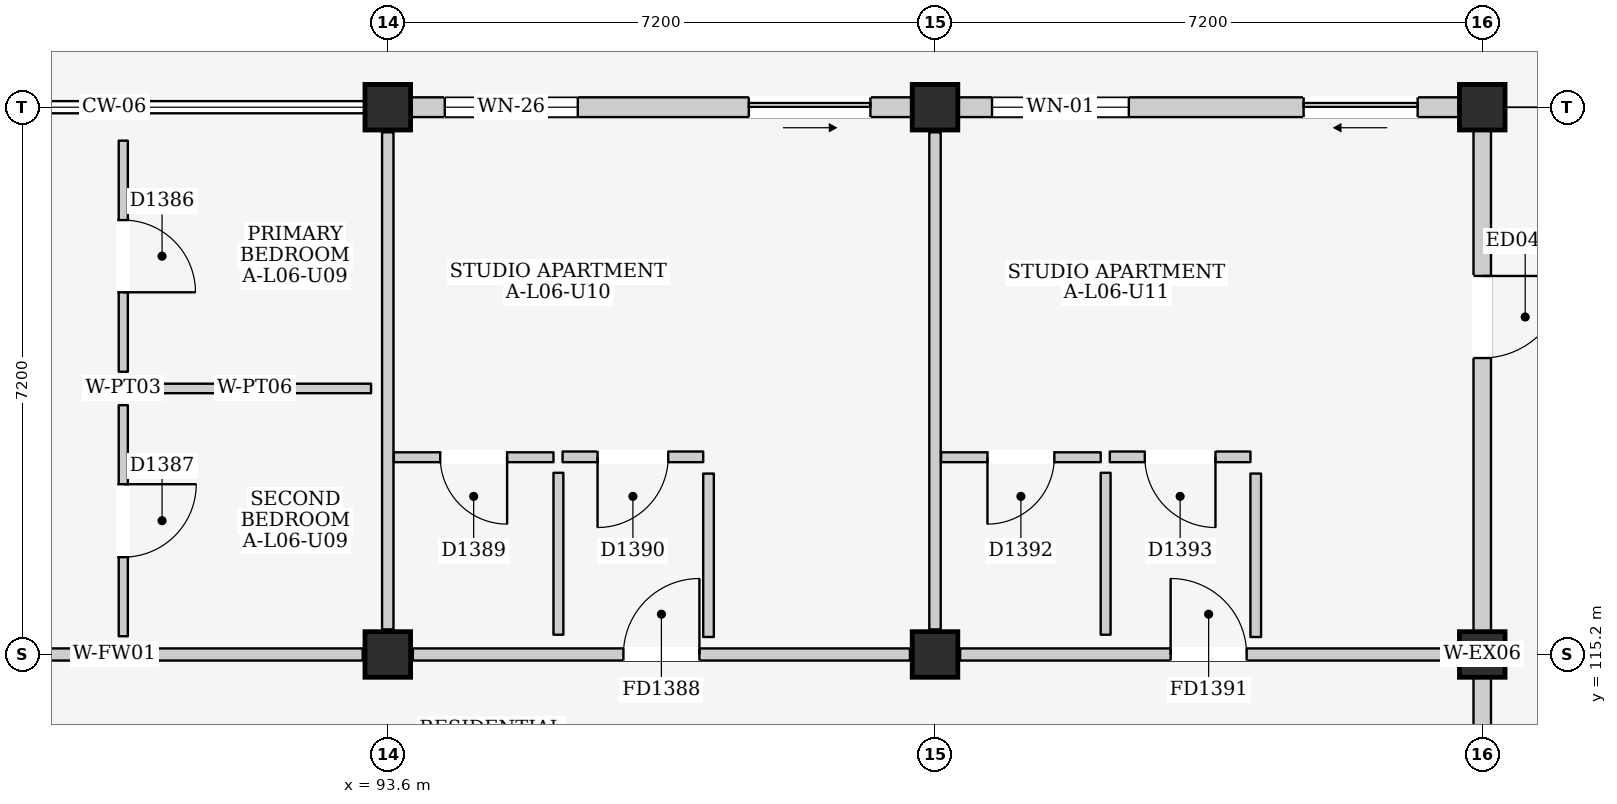
"""IFC4 building model, lengths in metres.
Left out: names, types, materials, properties, quantities, classifications, styles, units other than length and angle.
Written with IfcOpenShell. Run it as: python <this file> out.ifc"""

import sys

from ifc_helpers import new_model, si_unit, direction, frame, frame_2d, origin, origin_2d, place, context, subcontext, project, spatial, rectangle, extrude, element, fill, save


model = new_model("IFC4")
c1 = context("Model", 3, precision=1e-05, world=origin(), true_north=direction((0.0, 1.0)))
c2 = subcontext(c1, "Body", "Model", "MODEL_VIEW")
j1 = project(units=[si_unit("LENGTHUNIT", "METRE"), si_unit("PLANEANGLEUNIT", "RADIAN")], contexts=[c1])
p1 = place(None, origin())
s1 = spatial("IfcSite", under=j1, at=p1, CompositionType="ELEMENT")
p2 = place(p1, origin())
s2 = spatial("IfcBuilding", under=s1, at=p2, CompositionType="ELEMENT")
p3 = place(p2, frame((0.0, 0.0, 21.9)))
s3 = spatial("IfcBuildingStorey", under=s2, at=p3, CompositionType="ELEMENT", Elevation=21.9)
for number, where, z_axis, x_axis in (
    (1, (93.6, 115.2, 0.0), (0.0, 0.0, 1.0), (1.0, 0.0, 0.0)),
    (2, (93.6, 122.4, 0.0), (0.0, 0.0, 1.0), (1.0, 0.0, 0.0)),
    (3, (100.8, 115.2, 0.0), (0.0, 0.0, 1.0), (1.0, 0.0, 0.0)),
    (4, (100.8, 122.4, 0.0), (0.0, 0.0, 1.0), (1.0, 0.0, 0.0)),
    (5, (108.0, 115.2, 0.0), (0.0, 0.0, 1.0), (1.0, 0.0, 0.0)),
    (6, (108.0, 122.4, 0.0), (0.0, 0.0, 1.0), (1.0, 0.0, 0.0)),
):
    element("IfcColumn", number, at=place(p3, frame(where, z_axis=z_axis, x_axis=x_axis)), inside=s3, PredefinedType="COLUMN", context=c2, shape_type="SweptSolid", body=[
        extrude(rectangle(XDim=0.6, YDim=0.6, at=origin_2d()), origin(), (0.0, 0.0, 1.0), 3.2),
    ])
p4 = place(p3, frame((93.9, 122.4, 0.0), z_axis=(0.0, 0.0, 1.0), x_axis=(1.0, 0.0, 0.0)))
e7 = element("IfcWall", 7, at=p4, inside=s3, PredefinedType="ELEMENTEDWALL", context=c2, shape_type="SweptSolid", body=[
    extrude(rectangle(XDim=6.6, YDim=0.26, at=frame_2d((3.3, 0.0))), origin(), (0.0, 0.0, 1.0), 2.515),
])
p5 = place(p4, frame((4.45, 0.0, 0.0)))
e8 = element("IfcOpeningElement", 8, at=p5, cuts=e7, PredefinedType="OPENING", context=c2, shape_type="SweptSolid", body=[
    extrude(rectangle(XDim=1.6, YDim=2.12, at=frame_2d((0.8, 1.06))), frame((0.0, 0.145, 0.0), z_axis=(0.0, -1.0, 0.0), x_axis=(1.0, 0.0, 0.0)), (0.0, 0.0, 1.0), 0.29),
])
p6 = place(p4, frame((0.45, 0.0, 0.855)))
e9 = element("IfcOpeningElement", 9, at=p6, cuts=e7, PredefinedType="OPENING", context=c2, shape_type="SweptSolid", body=[
    extrude(rectangle(XDim=1.75, YDim=1.55, at=frame_2d((0.875, 0.775))), frame((0.0, 0.145, 0.0), z_axis=(0.0, -1.0, 0.0), x_axis=(1.0, 0.0, 0.0)), (0.0, 0.0, 1.0), 0.29),
])
p7 = place(p3, frame((101.1, 122.4, 0.0), z_axis=(0.0, 0.0, 1.0), x_axis=(1.0, 0.0, 0.0)))
e10 = element("IfcWall", 10, at=p7, inside=s3, PredefinedType="ELEMENTEDWALL", context=c2, shape_type="SweptSolid", body=[
    extrude(rectangle(XDim=6.6, YDim=0.26, at=frame_2d((3.3, 0.0))), origin(), (0.0, 0.0, 1.0), 2.515),
])
p8 = place(p7, frame((4.55, 0.0, 0.0)))
e11 = element("IfcOpeningElement", 11, at=p8, cuts=e10, PredefinedType="OPENING", context=c2, shape_type="SweptSolid", body=[
    extrude(rectangle(XDim=1.5, YDim=2.12, at=frame_2d((0.75, 1.06))), frame((0.0, 0.145, 0.0), z_axis=(0.0, -1.0, 0.0), x_axis=(1.0, 0.0, 0.0)), (0.0, 0.0, 1.0), 0.29),
])
p9 = place(p7, frame((0.45, 0.0, 0.9)))
e12 = element("IfcOpeningElement", 12, at=p9, cuts=e10, PredefinedType="OPENING", context=c2, shape_type="SweptSolid", body=[
    extrude(rectangle(XDim=1.8, YDim=1.5, at=frame_2d((0.9, 0.75))), frame((0.0, 0.145, 0.0), z_axis=(0.0, -1.0, 0.0), x_axis=(1.0, 0.0, 0.0)), (0.0, 0.0, 1.0), 0.29),
])
p10 = place(p3, frame((108.0, 108.3, 0.0), z_axis=(0.0, 0.0, 1.0), x_axis=(0.0, 1.0, 0.0)))
e13 = element("IfcWall", 13, at=p10, inside=s3, PredefinedType="ELEMENTEDWALL", context=c2, shape_type="SweptSolid", body=[
    extrude(rectangle(XDim=6.6, YDim=0.23, at=frame_2d((3.3, 0.0))), origin(), (0.0, 0.0, 1.0), 2.465),
])
p11 = place(p10, frame((2.75, 0.0, 1.1)))
e14 = element("IfcOpeningElement", 14, at=p11, cuts=e13, PredefinedType="OPENING", context=c2, shape_type="SweptSolid", body=[
    extrude(rectangle(XDim=1.0, YDim=0.9, at=frame_2d((0.5, 0.45))), frame((0.0, 0.13, 0.0), z_axis=(0.0, -1.0, 0.0), x_axis=(1.0, 0.0, 0.0)), (0.0, 0.0, 1.0), 0.26),
])
p12 = place(p3, frame((108.0, 115.5, 0.0), z_axis=(0.0, 0.0, 1.0), x_axis=(0.0, 1.0, 0.0)))
e15 = element("IfcWall", 15, at=p12, inside=s3, PredefinedType="ELEMENTEDWALL", context=c2, shape_type="SweptSolid", body=[
    extrude(rectangle(XDim=6.6, YDim=0.23, at=frame_2d((3.3, 0.0))), origin(), (0.0, 0.0, 1.0), 2.465),
])
p13 = place(p12, frame((3.6, 0.0, 0.0)))
e16 = element("IfcOpeningElement", 16, at=p13, cuts=e15, PredefinedType="OPENING", context=c2, shape_type="SweptSolid", body=[
    extrude(rectangle(XDim=1.08, YDim=2.12, at=frame_2d((0.54, 1.06))), frame((0.0, 0.13, 0.0), z_axis=(0.0, -1.0, 0.0), x_axis=(1.0, 0.0, 0.0)), (0.0, 0.0, 1.0), 0.26),
])
p14 = place(p3, frame((86.73, 115.2, 0.0), z_axis=(0.0, 0.0, 1.0), x_axis=(1.0, 0.0, 0.0)))
e17 = element("IfcWall", 17, at=p14, inside=s3, PredefinedType="PARTITIONING", context=c2, shape_type="SweptSolid", body=[
    extrude(rectangle(XDim=6.54, YDim=0.16, at=frame_2d((3.27, 0.0))), origin(), (0.0, 0.0, 1.0), 2.315),
])
p15 = place(p3, frame((93.6, 115.53, 0.0), z_axis=(0.0, 0.0, 1.0), x_axis=(0.0, 1.0, 0.0)))
e18 = element("IfcWall", 18, at=p15, inside=s3, PredefinedType="PARTITIONING", context=c2, shape_type="SweptSolid", body=[
    extrude(rectangle(XDim=6.54, YDim=0.15, at=frame_2d((3.27, 0.0))), origin(), (0.0, 0.0, 1.0), 2.465),
])
p16 = place(p3, frame((90.12, 118.92, 0.0), z_axis=(0.0, 0.0, 1.0), x_axis=(0.0, 1.0, 0.0)))
e19 = element("IfcWall", 19, at=p16, inside=s3, PredefinedType="PARTITIONING", context=c2, shape_type="SweptSolid", body=[
    extrude(rectangle(XDim=3.04, YDim=0.12, at=frame_2d((1.52, 0.0))), origin(), (0.0, 0.0, 1.0), 2.98),
])
p17 = place(p16, frame((1.045, 0.0, 0.0)))
e20 = element("IfcOpeningElement", 20, at=p17, cuts=e19, PredefinedType="OPENING", context=c2, shape_type="SweptSolid", body=[
    extrude(rectangle(XDim=0.95, YDim=2.15, at=frame_2d((0.475, 1.075))), frame((0.0, 0.075, 0.0), z_axis=(0.0, -1.0, 0.0), x_axis=(1.0, 0.0, 0.0)), (0.0, 0.0, 1.0), 0.15),
])
p18 = place(p3, frame((90.32, 118.7, 0.0), z_axis=(0.0, 0.0, 1.0), x_axis=(1.0, 0.0, 0.0)))
e21 = element("IfcWall", 21, at=p18, inside=s3, PredefinedType="PARTITIONING", context=c2, shape_type="SweptSolid", body=[
    extrude(rectangle(XDim=3.06, YDim=0.125, at=frame_2d((1.53, 0.0))), origin(), (0.0, 0.0, 1.0), 2.98),
])
p19 = place(p3, frame((90.12, 115.44, 0.0), z_axis=(0.0, 0.0, 1.0), x_axis=(0.0, 1.0, 0.0)))
e22 = element("IfcWall", 22, at=p19, inside=s3, PredefinedType="PARTITIONING", context=c2, shape_type="SweptSolid", body=[
    extrude(rectangle(XDim=3.04, YDim=0.12, at=frame_2d((1.52, 0.0))), origin(), (0.0, 0.0, 1.0), 2.98),
])
p20 = place(p19, frame((1.04, 0.0, 0.0)))
e23 = element("IfcOpeningElement", 23, at=p20, cuts=e22, PredefinedType="OPENING", context=c2, shape_type="SweptSolid", body=[
    extrude(rectangle(XDim=0.96, YDim=2.15, at=frame_2d((0.48, 1.075))), frame((0.0, 0.075, 0.0), z_axis=(0.0, -1.0, 0.0), x_axis=(1.0, 0.0, 0.0)), (0.0, 0.0, 1.0), 0.15),
])
p21 = place(p3, frame((93.93, 115.2, 0.0), z_axis=(0.0, 0.0, 1.0), x_axis=(1.0, 0.0, 0.0)))
e24 = element("IfcWall", 24, at=p21, inside=s3, PredefinedType="PARTITIONING", context=c2, shape_type="SweptSolid", body=[
    extrude(rectangle(XDim=6.54, YDim=0.16, at=frame_2d((3.27, 0.0))), origin(), (0.0, 0.0, 1.0), 2.315),
])
p22 = place(p21, frame((2.77, 0.0, 0.0)))
e25 = element("IfcOpeningElement", 25, at=p22, cuts=e24, PredefinedType="OPENING", context=c2, shape_type="SweptSolid", body=[
    extrude(rectangle(XDim=1.0, YDim=2.15, at=frame_2d((0.5, 1.075))), frame((0.0, 0.095, 0.0), z_axis=(0.0, -1.0, 0.0), x_axis=(1.0, 0.0, 0.0)), (0.0, 0.0, 1.0), 0.19),
])
p23 = place(p3, frame((100.8, 115.53, 0.0), z_axis=(0.0, 0.0, 1.0), x_axis=(0.0, 1.0, 0.0)))
e26 = element("IfcWall", 26, at=p23, inside=s3, PredefinedType="PARTITIONING", context=c2, shape_type="SweptSolid", body=[
    extrude(rectangle(XDim=6.54, YDim=0.15, at=frame_2d((3.27, 0.0))), origin(), (0.0, 0.0, 1.0), 2.465),
])
p24 = place(p3, frame((93.68, 117.795, 0.0), z_axis=(0.0, 0.0, 1.0), x_axis=(1.0, 0.0, 0.0)))
e27 = element("IfcWall", 27, at=p24, inside=s3, PredefinedType="PARTITIONING", context=c2, shape_type="SweptSolid", body=[
    extrude(rectangle(XDim=2.1, YDim=0.13, at=frame_2d((1.05, 0.0))), origin(), (0.0, 0.0, 1.0), 2.98),
])
p25 = place(p24, frame((0.61, 0.0, 0.0)))
e28 = element("IfcOpeningElement", 28, at=p25, cuts=e27, PredefinedType="OPENING", context=c2, shape_type="SweptSolid", body=[
    extrude(rectangle(XDim=0.88, YDim=2.1, at=frame_2d((0.44, 1.05))), frame((0.0, 0.08, 0.0), z_axis=(0.0, -1.0, 0.0), x_axis=(1.0, 0.0, 0.0)), (0.0, 0.0, 1.0), 0.16),
])
p26 = place(p3, frame((95.845, 115.46, 0.0), z_axis=(0.0, 0.0, 1.0), x_axis=(0.0, 1.0, 0.0)))
e29 = element("IfcWall", 29, at=p26, inside=s3, PredefinedType="PARTITIONING", context=c2, shape_type="SweptSolid", body=[
    extrude(rectangle(XDim=2.13, YDim=0.13, at=frame_2d((1.065, 0.0))), origin(), (0.0, 0.0, 1.0), 2.98),
])
p27 = place(p3, frame((95.9, 117.8, 0.0), z_axis=(0.0, 0.0, 1.0), x_axis=(1.0, 0.0, 0.0)))
e30 = element("IfcWall", 30, at=p27, inside=s3, PredefinedType="PARTITIONING", context=c2, shape_type="SweptSolid", body=[
    extrude(rectangle(XDim=1.85, YDim=0.14, at=frame_2d((0.925, 0.0))), origin(), (0.0, 0.0, 1.0), 2.98),
])
p28 = place(p27, frame((0.46, 0.0, 0.0)))
e31 = element("IfcOpeningElement", 31, at=p28, cuts=e30, PredefinedType="OPENING", context=c2, shape_type="SweptSolid", body=[
    extrude(rectangle(XDim=0.93, YDim=2.14, at=frame_2d((0.465, 1.07))), frame((0.0, 0.085, 0.0), z_axis=(0.0, -1.0, 0.0), x_axis=(1.0, 0.0, 0.0)), (0.0, 0.0, 1.0), 0.17),
])
p29 = place(p3, frame((97.82, 115.43, 0.0), z_axis=(0.0, 0.0, 1.0), x_axis=(0.0, 1.0, 0.0)))
e32 = element("IfcWall", 32, at=p29, inside=s3, PredefinedType="PARTITIONING", context=c2, shape_type="SweptSolid", body=[
    extrude(rectangle(XDim=2.15, YDim=0.14, at=frame_2d((1.075, 0.0))), origin(), (0.0, 0.0, 1.0), 2.98),
])
p30 = place(p3, frame((101.13, 115.2, 0.0), z_axis=(0.0, 0.0, 1.0), x_axis=(1.0, 0.0, 0.0)))
e33 = element("IfcWall", 33, at=p30, inside=s3, PredefinedType="PARTITIONING", context=c2, shape_type="SweptSolid", body=[
    extrude(rectangle(XDim=6.54, YDim=0.16, at=frame_2d((3.27, 0.0))), origin(), (0.0, 0.0, 1.0), 2.315),
])
p31 = place(p30, frame((2.77, 0.0, 0.0)))
e34 = element("IfcOpeningElement", 34, at=p31, cuts=e33, PredefinedType="OPENING", context=c2, shape_type="SweptSolid", body=[
    extrude(rectangle(XDim=1.0, YDim=2.15, at=frame_2d((0.5, 1.075))), frame((0.0, 0.095, 0.0), z_axis=(0.0, -1.0, 0.0), x_axis=(1.0, 0.0, 0.0)), (0.0, 0.0, 1.0), 0.19),
])
p32 = place(p3, frame((100.88, 117.795, 0.0), z_axis=(0.0, 0.0, 1.0), x_axis=(1.0, 0.0, 0.0)))
e35 = element("IfcWall", 35, at=p32, inside=s3, PredefinedType="PARTITIONING", context=c2, shape_type="SweptSolid", body=[
    extrude(rectangle(XDim=2.1, YDim=0.13, at=frame_2d((1.05, 0.0))), origin(), (0.0, 0.0, 1.0), 2.98),
])
p33 = place(p32, frame((0.61, 0.0, 0.0)))
e36 = element("IfcOpeningElement", 36, at=p33, cuts=e35, PredefinedType="OPENING", context=c2, shape_type="SweptSolid", body=[
    extrude(rectangle(XDim=0.88, YDim=2.1, at=frame_2d((0.44, 1.05))), frame((0.0, 0.08, 0.0), z_axis=(0.0, -1.0, 0.0), x_axis=(1.0, 0.0, 0.0)), (0.0, 0.0, 1.0), 0.16),
])
p34 = place(p3, frame((103.045, 115.46, 0.0), z_axis=(0.0, 0.0, 1.0), x_axis=(0.0, 1.0, 0.0)))
e37 = element("IfcWall", 37, at=p34, inside=s3, PredefinedType="PARTITIONING", context=c2, shape_type="SweptSolid", body=[
    extrude(rectangle(XDim=2.13, YDim=0.13, at=frame_2d((1.065, 0.0))), origin(), (0.0, 0.0, 1.0), 2.98),
])
p35 = place(p3, frame((103.1, 117.8, 0.0), z_axis=(0.0, 0.0, 1.0), x_axis=(1.0, 0.0, 0.0)))
e38 = element("IfcWall", 38, at=p35, inside=s3, PredefinedType="PARTITIONING", context=c2, shape_type="SweptSolid", body=[
    extrude(rectangle(XDim=1.85, YDim=0.14, at=frame_2d((0.925, 0.0))), origin(), (0.0, 0.0, 1.0), 2.98),
])
p36 = place(p35, frame((0.46, 0.0, 0.0)))
e39 = element("IfcOpeningElement", 39, at=p36, cuts=e38, PredefinedType="OPENING", context=c2, shape_type="SweptSolid", body=[
    extrude(rectangle(XDim=0.93, YDim=2.14, at=frame_2d((0.465, 1.07))), frame((0.0, 0.085, 0.0), z_axis=(0.0, -1.0, 0.0), x_axis=(1.0, 0.0, 0.0)), (0.0, 0.0, 1.0), 0.17),
])
p37 = place(p3, frame((105.02, 115.43, 0.0), z_axis=(0.0, 0.0, 1.0), x_axis=(0.0, 1.0, 0.0)))
e40 = element("IfcWall", 40, at=p37, inside=s3, PredefinedType="PARTITIONING", context=c2, shape_type="SweptSolid", body=[
    extrude(rectangle(XDim=2.15, YDim=0.14, at=frame_2d((1.075, 0.0))), origin(), (0.0, 0.0, 1.0), 2.98),
])
p38 = place(p5, frame((1.6, 0.0, 0.0), z_axis=(0.0, 0.0, 1.0), x_axis=(-1.0, 0.0, 0.0)))
e41 = element("IfcDoor", 41, at=p38, inside=s3, OperationType="SLIDING_TO_RIGHT", PredefinedType="DOOR", context=c2, shape_type="SweptSolid", body=[
    extrude(rectangle(XDim=1.6, YDim=2.12, at=frame_2d((0.8, 1.06))), frame((0.0, 0.025, 0.0), z_axis=(0.0, -1.0, 0.0), x_axis=(1.0, 0.0, 0.0)), (0.0, 0.0, 1.0), 0.05),
])
fill(e8, e41)
p39 = place(p6, origin())
e42 = element("IfcWindow", 42, at=p39, inside=s3, PartitioningType="DOUBLE_PANEL_VERTICAL", PredefinedType="WINDOW", context=c2, shape_type="SweptSolid", body=[
    extrude(rectangle(XDim=1.75, YDim=1.55, at=frame_2d((0.875, 0.775))), frame((0.0, 0.03, 0.0), z_axis=(0.0, -1.0, 0.0), x_axis=(1.0, 0.0, 0.0)), (0.0, 0.0, 1.0), 0.06),
])
fill(e9, e42)
p40 = place(p8, frame((1.5, 0.0, 0.0), z_axis=(0.0, 0.0, 1.0), x_axis=(-1.0, 0.0, 0.0)))
e43 = element("IfcDoor", 43, at=p40, inside=s3, OperationType="SLIDING_TO_LEFT", PredefinedType="DOOR", context=c2, shape_type="SweptSolid", body=[
    extrude(rectangle(XDim=1.5, YDim=2.12, at=frame_2d((0.75, 1.06))), frame((0.0, 0.025, 0.0), z_axis=(0.0, -1.0, 0.0), x_axis=(1.0, 0.0, 0.0)), (0.0, 0.0, 1.0), 0.05),
])
fill(e11, e43)
p41 = place(p9, origin())
e44 = element("IfcWindow", 44, at=p41, inside=s3, PartitioningType="DOUBLE_PANEL_VERTICAL", PredefinedType="WINDOW", context=c2, shape_type="SweptSolid", body=[
    extrude(rectangle(XDim=1.8, YDim=1.5, at=frame_2d((0.9, 0.75))), frame((0.0, 0.03, 0.0), z_axis=(0.0, -1.0, 0.0), x_axis=(1.0, 0.0, 0.0)), (0.0, 0.0, 1.0), 0.06),
])
fill(e12, e44)
p42 = place(p13, frame((1.08, 0.0, 0.0), z_axis=(0.0, 0.0, 1.0), x_axis=(-1.0, 0.0, 0.0)))
e45 = element("IfcDoor", 45, at=p42, inside=s3, OperationType="SINGLE_SWING_LEFT", PredefinedType="DOOR", context=c2, shape_type="SweptSolid", body=[
    extrude(rectangle(XDim=1.08, YDim=2.12, at=frame_2d((0.54, 1.06))), frame((0.0, 0.025, 0.0), z_axis=(0.0, -1.0, 0.0), x_axis=(1.0, 0.0, 0.0)), (0.0, 0.0, 1.0), 0.05),
])
fill(e16, e45)
p43 = place(p17, frame((0.95, 0.0, 0.0), z_axis=(0.0, 0.0, 1.0), x_axis=(-1.0, 0.0, 0.0)))
e46 = element("IfcDoor", 46, at=p43, inside=s3, OperationType="SINGLE_SWING_RIGHT", PredefinedType="DOOR", context=c2, shape_type="SweptSolid", body=[
    extrude(rectangle(XDim=0.95, YDim=2.15, at=frame_2d((0.475, 1.075))), frame((0.0, 0.025, 0.0), z_axis=(0.0, -1.0, 0.0), x_axis=(1.0, 0.0, 0.0)), (0.0, 0.0, 1.0), 0.05),
])
fill(e20, e46)
p44 = place(p20, frame((0.96, 0.0, 0.0), z_axis=(0.0, 0.0, 1.0), x_axis=(-1.0, 0.0, 0.0)))
e47 = element("IfcDoor", 47, at=p44, inside=s3, OperationType="SINGLE_SWING_LEFT", PredefinedType="DOOR", context=c2, shape_type="SweptSolid", body=[
    extrude(rectangle(XDim=0.96, YDim=2.15, at=frame_2d((0.48, 1.075))), frame((0.0, 0.025, 0.0), z_axis=(0.0, -1.0, 0.0), x_axis=(1.0, 0.0, 0.0)), (0.0, 0.0, 1.0), 0.05),
])
fill(e23, e47)
p45 = place(p22, origin())
e48 = element("IfcDoor", 48, at=p45, inside=s3, OperationType="SINGLE_SWING_RIGHT", PredefinedType="DOOR", context=c2, shape_type="SweptSolid", body=[
    extrude(rectangle(XDim=1.0, YDim=2.15, at=frame_2d((0.5, 1.075))), frame((0.0, 0.025, 0.0), z_axis=(0.0, -1.0, 0.0), x_axis=(1.0, 0.0, 0.0)), (0.0, 0.0, 1.0), 0.05),
])
fill(e25, e48)
p46 = place(p25, frame((0.88, 0.0, 0.0), z_axis=(0.0, 0.0, 1.0), x_axis=(-1.0, 0.0, 0.0)))
e49 = element("IfcDoor", 49, at=p46, inside=s3, OperationType="SINGLE_SWING_LEFT", PredefinedType="DOOR", context=c2, shape_type="SweptSolid", body=[
    extrude(rectangle(XDim=0.88, YDim=2.1, at=frame_2d((0.44, 1.05))), frame((0.0, 0.025, 0.0), z_axis=(0.0, -1.0, 0.0), x_axis=(1.0, 0.0, 0.0)), (0.0, 0.0, 1.0), 0.05),
])
fill(e28, e49)
p47 = place(p28, frame((0.93, 0.0, 0.0), z_axis=(0.0, 0.0, 1.0), x_axis=(-1.0, 0.0, 0.0)))
e50 = element("IfcDoor", 50, at=p47, inside=s3, OperationType="SINGLE_SWING_RIGHT", PredefinedType="DOOR", context=c2, shape_type="SweptSolid", body=[
    extrude(rectangle(XDim=0.93, YDim=2.14, at=frame_2d((0.465, 1.07))), frame((0.0, 0.025, 0.0), z_axis=(0.0, -1.0, 0.0), x_axis=(1.0, 0.0, 0.0)), (0.0, 0.0, 1.0), 0.05),
])
fill(e31, e50)
p48 = place(p31, origin())
e51 = element("IfcDoor", 51, at=p48, inside=s3, OperationType="SINGLE_SWING_LEFT", PredefinedType="DOOR", context=c2, shape_type="SweptSolid", body=[
    extrude(rectangle(XDim=1.0, YDim=2.15, at=frame_2d((0.5, 1.075))), frame((0.0, 0.025, 0.0), z_axis=(0.0, -1.0, 0.0), x_axis=(1.0, 0.0, 0.0)), (0.0, 0.0, 1.0), 0.05),
])
fill(e34, e51)
p49 = place(p33, frame((0.88, 0.0, 0.0), z_axis=(0.0, 0.0, 1.0), x_axis=(-1.0, 0.0, 0.0)))
e52 = element("IfcDoor", 52, at=p49, inside=s3, OperationType="SINGLE_SWING_RIGHT", PredefinedType="DOOR", context=c2, shape_type="SweptSolid", body=[
    extrude(rectangle(XDim=0.88, YDim=2.1, at=frame_2d((0.44, 1.05))), frame((0.0, 0.025, 0.0), z_axis=(0.0, -1.0, 0.0), x_axis=(1.0, 0.0, 0.0)), (0.0, 0.0, 1.0), 0.05),
])
fill(e36, e52)
p50 = place(p36, frame((0.93, 0.0, 0.0), z_axis=(0.0, 0.0, 1.0), x_axis=(-1.0, 0.0, 0.0)))
e53 = element("IfcDoor", 53, at=p50, inside=s3, OperationType="SINGLE_SWING_LEFT", PredefinedType="DOOR", context=c2, shape_type="SweptSolid", body=[
    extrude(rectangle(XDim=0.93, YDim=2.14, at=frame_2d((0.465, 1.07))), frame((0.0, 0.025, 0.0), z_axis=(0.0, -1.0, 0.0), x_axis=(1.0, 0.0, 0.0)), (0.0, 0.0, 1.0), 0.05),
])
fill(e39, e53)
save(model, sys.argv[1])
